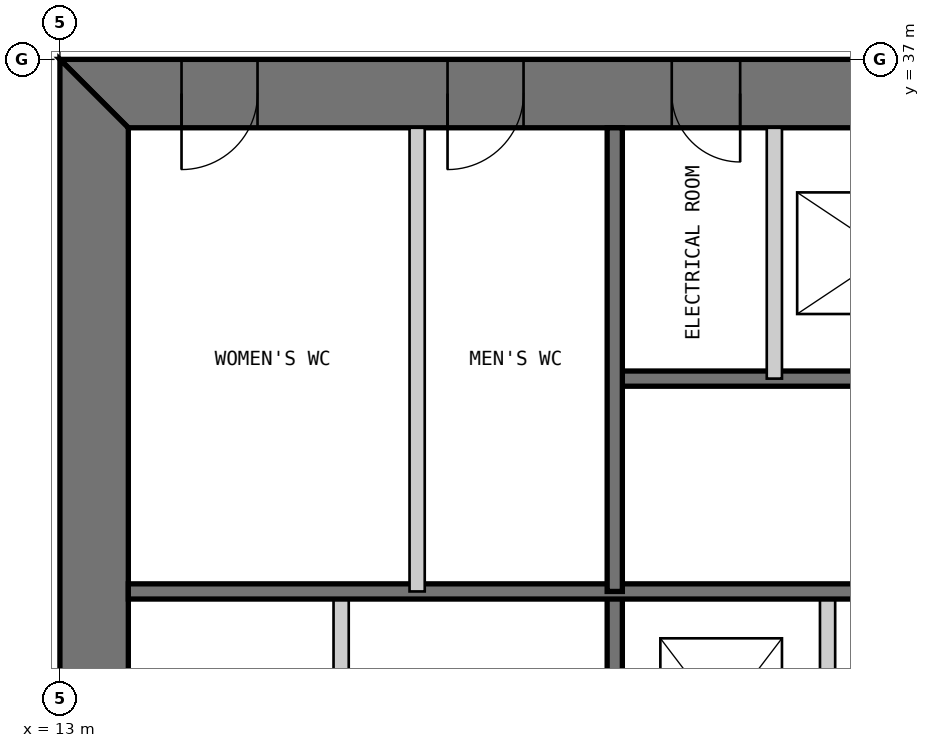
"""IFC4 building model, lengths in metres.
Left out: names, types, materials, properties, quantities, classifications, styles, units other than length and angle.
Written with IfcOpenShell. Run it as: python <this file> out.ifc"""

import sys

from ifc_helpers import new_model, si_unit, direction, frame, frame_2d, origin, place, context, subcontext, project, spatial, polyline, rectangle, outline, extrude, element, fill, save


model = new_model("IFC4")
c1 = context("Model", 3, precision=1e-05, world=origin(), true_north=direction((0.0, 1.0)))
c2 = subcontext(c1, "Body", "Model", "MODEL_VIEW")
j1 = project(units=[si_unit("LENGTHUNIT", "METRE"), si_unit("PLANEANGLEUNIT", "RADIAN")], contexts=[c1])
p1 = place(None, origin())
s1 = spatial("IfcSite", under=j1, at=p1, CompositionType="ELEMENT")
p2 = place(p1, origin())
s2 = spatial("IfcBuilding", under=s1, at=p2, CompositionType="ELEMENT")
p3 = place(p2, frame((0.0, 0.0, 154.4)))
s3 = spatial("IfcBuildingStorey", under=s2, at=p3, CompositionType="ELEMENT", Elevation=154.4)
p4 = place(p3, frame((37.0, 36.55, 0.0), z_axis=(0.0, 0.0, 1.0), x_axis=(-1.0, 0.0, 0.0)))
e1 = element("IfcWall", 1, at=p4, inside=s3, PredefinedType="SHEAR", context=c2, shape_type="SweptSolid", body=[
    extrude(outline(polyline([(0.0, -0.45), (24.0, -0.45), (23.1, 0.45), (0.9, 0.45), (0.0, -0.45)])), origin(), (0.0, 0.0, 1.0), 4.0),
])
p5 = place(p4, frame((4.9, 0.0, 0.0)))
e2 = element("IfcOpeningElement", 2, at=p5, cuts=e1, PredefinedType="OPENING", context=c2, shape_type="SweptSolid", body=[
    extrude(rectangle(XDim=1.0, YDim=2.2, at=frame_2d((0.5, 1.1))), frame((0.0, 0.46, 0.0), z_axis=(0.0, -1.0, 0.0), x_axis=(1.0, 0.0, 0.0)), (0.0, 0.0, 1.0), 0.92),
])
p6 = place(p4, frame((8.9, 0.0, 0.0)))
e3 = element("IfcOpeningElement", 3, at=p6, cuts=e1, PredefinedType="OPENING", context=c2, shape_type="SweptSolid", body=[
    extrude(rectangle(XDim=1.1, YDim=2.2, at=frame_2d((0.55, 1.1))), frame((0.0, 0.46, 0.0), z_axis=(0.0, -1.0, 0.0), x_axis=(1.0, 0.0, 0.0)), (0.0, 0.0, 1.0), 0.92),
])
p7 = place(p4, frame((15.05, 0.0, 0.0)))
e4 = element("IfcOpeningElement", 4, at=p7, cuts=e1, PredefinedType="OPENING", context=c2, shape_type="SweptSolid", body=[
    extrude(rectangle(XDim=0.9, YDim=2.2, at=frame_2d((0.45, 1.1))), frame((0.0, 0.46, 0.0), z_axis=(0.0, -1.0, 0.0), x_axis=(1.0, 0.0, 0.0)), (0.0, 0.0, 1.0), 0.92),
])
p8 = place(p4, frame((17.9, 0.0, 0.0)))
e5 = element("IfcOpeningElement", 5, at=p8, cuts=e1, PredefinedType="OPENING", context=c2, shape_type="SweptSolid", body=[
    extrude(rectangle(XDim=1.0, YDim=2.2, at=frame_2d((0.5, 1.1))), frame((0.0, 0.46, 0.0), z_axis=(0.0, -1.0, 0.0), x_axis=(1.0, 0.0, 0.0)), (0.0, 0.0, 1.0), 0.92),
])
p9 = place(p4, frame((21.4, 0.0, 0.0)))
e6 = element("IfcOpeningElement", 6, at=p9, cuts=e1, PredefinedType="OPENING", context=c2, shape_type="SweptSolid", body=[
    extrude(rectangle(XDim=1.0, YDim=2.2, at=frame_2d((0.5, 1.1))), frame((0.0, 0.46, 0.0), z_axis=(0.0, -1.0, 0.0), x_axis=(1.0, 0.0, 0.0)), (0.0, 0.0, 1.0), 0.92),
])
p10 = place(p3, frame((13.45, 36.1, 0.0), z_axis=(0.0, 0.0, 1.0), x_axis=(0.0, -1.0, 0.0)))
e7 = element("IfcWall", 7, at=p10, inside=s3, PredefinedType="SHEAR", context=c2, shape_type="SweptSolid", body=[
    extrude(outline(polyline([(-0.9, -0.45), (23.1, -0.45), (22.2, 0.45), (0.0, 0.45), (-0.9, -0.45)])), origin(), (0.0, 0.0, 1.0), 4.0),
])
p11 = place(p10, frame((20.2, 0.0, 0.0)))
e8 = element("IfcOpeningElement", 8, at=p11, cuts=e7, PredefinedType="OPENING", context=c2, shape_type="SweptSolid", body=[
    extrude(rectangle(XDim=1.0, YDim=2.2, at=frame_2d((0.5, 1.1))), frame((0.0, 0.46, 0.0), z_axis=(0.0, -1.0, 0.0), x_axis=(1.0, 0.0, 0.0)), (0.0, 0.0, 1.0), 0.92),
])
p12 = place(p10, frame((17.25, 0.0, 0.0)))
e9 = element("IfcOpeningElement", 9, at=p12, cuts=e7, PredefinedType="OPENING", context=c2, shape_type="SweptSolid", body=[
    extrude(rectangle(XDim=0.9, YDim=2.2, at=frame_2d((0.45, 1.1))), frame((0.0, 0.46, 0.0), z_axis=(0.0, -1.0, 0.0), x_axis=(1.0, 0.0, 0.0)), (0.0, 0.0, 1.0), 0.92),
])
p13 = place(p3, frame((16.7, 13.9, 0.0), z_axis=(0.0, 0.0, 1.0), x_axis=(0.0, 1.0, 0.0)))
e10 = element("IfcWall", 10, at=p13, inside=s3, PredefinedType="PARTITIONING", context=c2, shape_type="SweptSolid", body=[
    extrude(rectangle(XDim=16.1, YDim=0.2, at=frame_2d((8.05, 0.0))), origin(), (0.0, 0.0, 1.0), 3.8),
])
p14 = place(p13, frame((6.15, 0.0, 0.0)))
e11 = element("IfcOpeningElement", 11, at=p14, cuts=e10, PredefinedType="OPENING", context=c2, shape_type="SweptSolid", body=[
    extrude(rectangle(XDim=0.9, YDim=2.2, at=frame_2d((0.45, 1.1))), frame((0.0, 0.11, 0.0), z_axis=(0.0, -1.0, 0.0), x_axis=(1.0, 0.0, 0.0)), (0.0, 0.0, 1.0), 0.22),
])
p15 = place(p13, frame((8.65, 0.0, 0.0)))
e12 = element("IfcOpeningElement", 12, at=p15, cuts=e10, PredefinedType="OPENING", context=c2, shape_type="SweptSolid", body=[
    extrude(rectangle(XDim=0.9, YDim=2.2, at=frame_2d((0.45, 1.1))), frame((0.0, 0.11, 0.0), z_axis=(0.0, -1.0, 0.0), x_axis=(1.0, 0.0, 0.0)), (0.0, 0.0, 1.0), 0.22),
])
p16 = place(p13, frame((12.8, 0.0, 0.0)))
e13 = element("IfcOpeningElement", 13, at=p16, cuts=e10, PredefinedType="OPENING", context=c2, shape_type="SweptSolid", body=[
    extrude(rectangle(XDim=0.9, YDim=2.2, at=frame_2d((0.45, 1.1))), frame((0.0, 0.11, 0.0), z_axis=(0.0, -1.0, 0.0), x_axis=(1.0, 0.0, 0.0)), (0.0, 0.0, 1.0), 0.22),
])
p17 = place(p3, frame((20.3, 13.9, 0.0), z_axis=(0.0, 0.0, 1.0), x_axis=(0.0, 1.0, 0.0)))
e14 = element("IfcWall", 14, at=p17, inside=s3, PredefinedType="SOLIDWALL", context=c2, shape_type="SweptSolid", body=[
    extrude(rectangle(XDim=16.1, YDim=0.2, at=frame_2d((8.05, 0.0))), origin(), (0.0, 0.0, 1.0), 3.8),
])
p18 = place(p17, frame((7.217, 0.0, 0.0)))
e15 = element("IfcOpeningElement", 15, at=p18, cuts=e14, PredefinedType="OPENING", context=c2, shape_type="SweptSolid", body=[
    extrude(rectangle(XDim=1.1, YDim=2.2, at=frame_2d((0.55, 1.1))), frame((0.0, 0.11, 0.0), z_axis=(0.0, -1.0, 0.0), x_axis=(1.0, 0.0, 0.0)), (0.0, 0.0, 1.0), 0.22),
])
p19 = place(p17, frame((10.55, 0.0, 0.0)))
e16 = element("IfcOpeningElement", 16, at=p19, cuts=e14, PredefinedType="OPENING", context=c2, shape_type="SweptSolid", body=[
    extrude(rectangle(XDim=1.1, YDim=2.2, at=frame_2d((0.55, 1.1))), frame((0.0, 0.11, 0.0), z_axis=(0.0, -1.0, 0.0), x_axis=(1.0, 0.0, 0.0)), (0.0, 0.0, 1.0), 0.22),
])
p20 = place(p17, frame((13.883, 0.0, 0.0)))
e17 = element("IfcOpeningElement", 17, at=p20, cuts=e14, PredefinedType="OPENING", context=c2, shape_type="SweptSolid", body=[
    extrude(rectangle(XDim=1.1, YDim=2.2, at=frame_2d((0.55, 1.1))), frame((0.0, 0.11, 0.0), z_axis=(0.0, -1.0, 0.0), x_axis=(1.0, 0.0, 0.0)), (0.0, 0.0, 1.0), 0.22),
])
p21 = place(p3, frame((23.1, 20.0, 0.0), z_axis=(0.0, 0.0, 1.0), x_axis=(0.0, 1.0, 0.0)))
e18 = element("IfcWall", 18, at=p21, inside=s3, PredefinedType="PARTITIONING", context=c2, shape_type="SweptSolid", body=[
    extrude(rectangle(XDim=10.0, YDim=0.2, at=frame_2d((5.0, 0.0))), origin(), (0.0, 0.0, 1.0), 3.8),
])
p22 = place(p3, frame((29.7, 32.8, 0.0), z_axis=(0.0, 0.0, 1.0), x_axis=(-1.0, 0.0, 0.0)))
e19 = element("IfcWall", 19, at=p22, inside=s3, PredefinedType="SOLIDWALL", context=c2, shape_type="SweptSolid", body=[
    extrude(rectangle(XDim=9.4, YDim=0.2, at=frame_2d((4.7, 0.0))), origin(), (0.0, 0.0, 1.0), 3.8),
])
p23 = place(p22, frame((0.25, 0.0, 0.0)))
e20 = element("IfcOpeningElement", 20, at=p23, cuts=e19, PredefinedType="OPENING", context=c2, shape_type="SweptSolid", body=[
    extrude(rectangle(XDim=1.0, YDim=2.2, at=frame_2d((0.5, 1.1))), frame((0.0, 0.11, 0.0), z_axis=(0.0, -1.0, 0.0), x_axis=(1.0, 0.0, 0.0)), (0.0, 0.0, 1.0), 0.22),
])
p24 = place(p3, frame((29.7, 30.0, 0.0), z_axis=(0.0, 0.0, 1.0), x_axis=(-1.0, 0.0, 0.0)))
e21 = element("IfcWall", 21, at=p24, inside=s3, PredefinedType="SOLIDWALL", context=c2, shape_type="SweptSolid", body=[
    extrude(rectangle(XDim=15.8, YDim=0.2, at=frame_2d((7.9, 0.0))), origin(), (0.0, 0.0, 1.0), 3.8),
])
p25 = place(p3, frame((22.4, 36.1, 0.0), z_axis=(0.0, 0.0, 1.0), x_axis=(0.0, -1.0, 0.0)))
e22 = element("IfcWall", 22, at=p25, inside=s3, PredefinedType="PARTITIONING", context=c2, shape_type="SweptSolid", body=[
    extrude(rectangle(XDim=3.3, YDim=0.2, at=frame_2d((1.65, 0.0))), origin(), (0.0, 0.0, 1.0), 3.8),
])
p26 = place(p3, frame((20.3, 36.1, 0.0), z_axis=(0.0, 0.0, 1.0), x_axis=(0.0, -1.0, 0.0)))
e23 = element("IfcWall", 23, at=p26, inside=s3, PredefinedType="SOLIDWALL", context=c2, shape_type="SweptSolid", body=[
    extrude(rectangle(XDim=6.1, YDim=0.2, at=frame_2d((3.05, 0.0))), origin(), (0.0, 0.0, 1.0), 3.8),
])
p27 = place(p3, frame((17.7, 36.1, 0.0), z_axis=(0.0, 0.0, 1.0), x_axis=(0.0, -1.0, 0.0)))
e24 = element("IfcWall", 24, at=p27, inside=s3, PredefinedType="PARTITIONING", context=c2, shape_type="SweptSolid", body=[
    extrude(rectangle(XDim=6.1, YDim=0.2, at=frame_2d((3.05, 0.0))), origin(), (0.0, 0.0, 1.0), 3.8),
])
p28 = place(p7, origin())
e25 = element("IfcDoor", 25, at=p28, inside=s3, OperationType="SINGLE_SWING_LEFT", PredefinedType="DOOR", context=c2, shape_type="SweptSolid", body=[
    extrude(rectangle(XDim=0.9, YDim=2.2, at=frame_2d((0.45, 1.1))), frame((0.0, 0.025, 0.0), z_axis=(0.0, -1.0, 0.0), x_axis=(1.0, 0.0, 0.0)), (0.0, 0.0, 1.0), 0.05),
    extrude(outline(polyline([(0.0, 0.0), (0.04, 0.0), (0.04, 2.16), (0.86, 2.16), (0.86, 0.0), (0.9, 0.0), (0.9, 2.2), (0.0, 2.2), (0.0, 0.0)])), frame((0.0, 0.3, 0.0), z_axis=(0.0, -1.0, 0.0), x_axis=(1.0, 0.0, 0.0)), (0.0, 0.0, 1.0), 0.6),
])
fill(e4, e25)
p29 = place(p8, origin())
e26 = element("IfcDoor", 26, at=p29, inside=s3, OperationType="SINGLE_SWING_RIGHT", PredefinedType="DOOR", context=c2, shape_type="SweptSolid", body=[
    extrude(rectangle(XDim=1.0, YDim=2.2, at=frame_2d((0.5, 1.1))), frame((0.0, 0.025, 0.0), z_axis=(0.0, -1.0, 0.0), x_axis=(1.0, 0.0, 0.0)), (0.0, 0.0, 1.0), 0.05),
    extrude(outline(polyline([(0.0, 0.0), (0.04, 0.0), (0.04, 2.16), (0.96, 2.16), (0.96, 0.0), (1.0, 0.0), (1.0, 2.2), (0.0, 2.2), (0.0, 0.0)])), frame((0.0, 0.3, 0.0), z_axis=(0.0, -1.0, 0.0), x_axis=(1.0, 0.0, 0.0)), (0.0, 0.0, 1.0), 0.6),
])
fill(e5, e26)
p30 = place(p9, origin())
e27 = element("IfcDoor", 27, at=p30, inside=s3, OperationType="SINGLE_SWING_RIGHT", PredefinedType="DOOR", context=c2, shape_type="SweptSolid", body=[
    extrude(rectangle(XDim=1.0, YDim=2.2, at=frame_2d((0.5, 1.1))), frame((0.0, 0.025, 0.0), z_axis=(0.0, -1.0, 0.0), x_axis=(1.0, 0.0, 0.0)), (0.0, 0.0, 1.0), 0.05),
    extrude(outline(polyline([(0.0, 0.0), (0.04, 0.0), (0.04, 2.16), (0.96, 2.16), (0.96, 0.0), (1.0, 0.0), (1.0, 2.2), (0.0, 2.2), (0.0, 0.0)])), frame((0.0, 0.3, 0.0), z_axis=(0.0, -1.0, 0.0), x_axis=(1.0, 0.0, 0.0)), (0.0, 0.0, 1.0), 0.6),
])
fill(e6, e27)
save(model, sys.argv[1])
